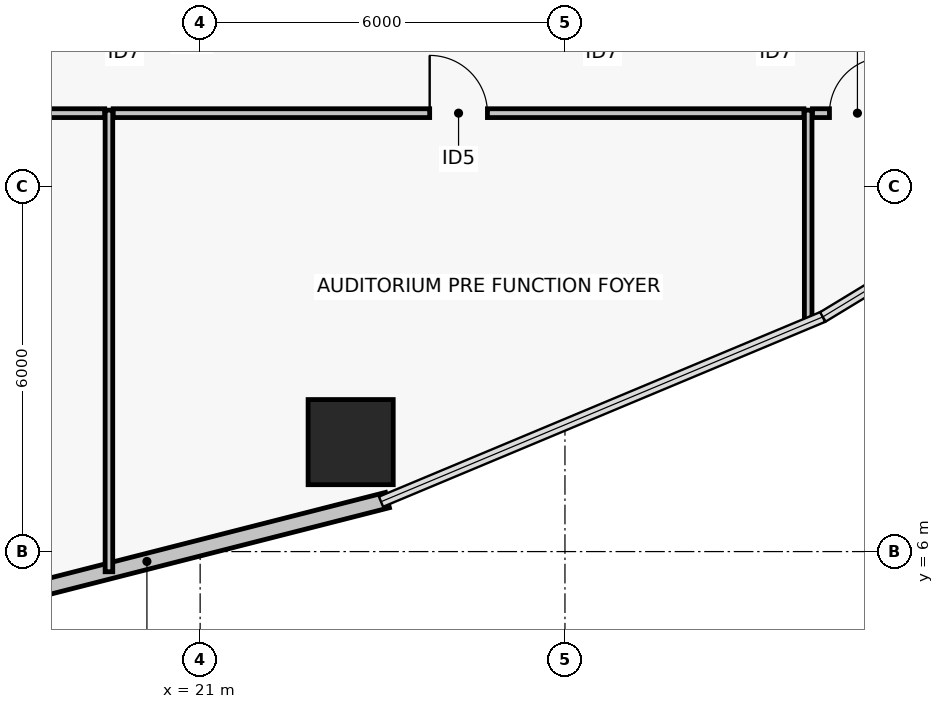
"""IFC4 building model, lengths in metres.
Left out: names, types, materials, properties, quantities, classifications, styles, units other than length and angle.
Written with IfcOpenShell. Run it as: python <this file> out.ifc"""

import sys

from ifc_helpers import new_model, si_unit, direction, frame, frame_2d, origin, origin_2d, place, context, subcontext, project, spatial, rectangle, hollow_rectangle, extrude, element, fill, save


model = new_model("IFC4")
c1 = context("Model", 3, precision=1e-05, world=origin(), true_north=direction((0.0, 1.0)))
c2 = subcontext(c1, "Body", "Model", "MODEL_VIEW")
j1 = project(units=[si_unit("LENGTHUNIT", "METRE"), si_unit("PLANEANGLEUNIT", "RADIAN")], contexts=[c1])
p1 = place(None, origin())
s1 = spatial("IfcSite", under=j1, at=p1, CompositionType="ELEMENT")
p2 = place(p1, origin())
s2 = spatial("IfcBuilding", under=s1, at=p2, CompositionType="ELEMENT")
p3 = place(p2, frame((0.0, 0.0, 18.0)))
s3 = spatial("IfcBuildingStorey", under=s2, at=p3, CompositionType="ELEMENT", Elevation=18.0)
p4 = place(p3, frame((23.476, 7.8, 0.0), z_axis=(0.0, 0.0, 1.0), x_axis=(1.0, 0.0, 0.0)))
e1 = element("IfcColumn", 1, at=p4, inside=s3, PredefinedType="COLUMN", context=c2, shape_type="SweptSolid", body=[
    extrude(hollow_rectangle(XDim=1.4, YDim=1.4, WallThickness=0.055, at=origin_2d()), origin(), (0.0, 0.0, 1.0), 4.8),
])
p5 = place(p3, frame((24.081, 6.847, 0.0), z_axis=(0.0, 0.0, 1.0), x_axis=(-0.968981557045, -0.247133045354, 0.0)))
e2 = element("IfcWall", 2, at=p5, inside=s3, PredefinedType="PARTITIONING", context=c2, shape_type="SweptSolid", body=[
    extrude(rectangle(XDim=8.167, YDim=0.26, at=frame_2d((4.083, 0.0))), origin(), (0.0, 0.0, 1.0), 4.48),
])
p6 = place(p3, frame((15.9, 13.21, 0.0), z_axis=(0.0, 0.0, 1.0), x_axis=(1.0, 0.0, 0.0)))
e3 = element("IfcWall", 3, at=p6, inside=s3, PredefinedType="PARTITIONING", context=c2, shape_type="SweptSolid", body=[
    extrude(rectangle(XDim=3.53, YDim=0.145, at=frame_2d((1.765, 0.0))), origin(), (0.0, 0.0, 1.0), 3.56),
])
p7 = place(p6, frame((0.28, 0.0, 0.0)))
e4 = element("IfcOpeningElement", 4, at=p7, cuts=e3, PredefinedType="OPENING", context=c2, shape_type="SweptSolid", body=[
    extrude(rectangle(XDim=0.92, YDim=2.05, at=frame_2d((0.46, 1.025))), frame((0.0, 0.083, 0.0), z_axis=(0.0, -1.0, 0.0), x_axis=(1.0, 0.0, 0.0)), (0.0, 0.0, 1.0), 0.165),
])
p8 = place(p3, frame((19.57, 13.21, 0.0), z_axis=(0.0, 0.0, 1.0), x_axis=(1.0, 0.0, 0.0)))
e5 = element("IfcWall", 5, at=p8, inside=s3, PredefinedType="PARTITIONING", context=c2, shape_type="SweptSolid", body=[
    extrude(rectangle(XDim=11.36, YDim=0.145, at=frame_2d((5.68, 0.0))), origin(), (0.0, 0.0, 1.0), 3.56),
])
p9 = place(p8, frame((5.205, 0.0, 0.0)))
e6 = element("IfcOpeningElement", 6, at=p9, cuts=e5, PredefinedType="OPENING", context=c2, shape_type="SweptSolid", body=[
    extrude(rectangle(XDim=0.95, YDim=2.06, at=frame_2d((0.475, 1.03))), frame((0.0, 0.083, 0.0), z_axis=(0.0, -1.0, 0.0), x_axis=(1.0, 0.0, 0.0)), (0.0, 0.0, 1.0), 0.165),
])
p10 = place(p3, frame((31.07, 13.21, 0.0), z_axis=(0.0, 0.0, 1.0), x_axis=(1.0, 0.0, 0.0)))
e7 = element("IfcWall", 7, at=p10, inside=s3, PredefinedType="PARTITIONING", context=c2, shape_type="SweptSolid", body=[
    extrude(rectangle(XDim=1.73, YDim=0.145, at=frame_2d((0.865, 0.0))), origin(), (0.0, 0.0, 1.0), 4.01),
])
p11 = place(p10, frame((0.28, 0.0, 0.0)))
e8 = element("IfcOpeningElement", 8, at=p11, cuts=e7, PredefinedType="OPENING", context=c2, shape_type="SweptSolid", body=[
    extrude(rectangle(XDim=0.92, YDim=2.05, at=frame_2d((0.46, 1.025))), frame((0.0, 0.083, 0.0), z_axis=(0.0, -1.0, 0.0), x_axis=(1.0, 0.0, 0.0)), (0.0, 0.0, 1.0), 0.165),
])
p12 = place(p3, frame((19.5, 5.668, 0.0), z_axis=(0.0, 0.0, 1.0), x_axis=(0.0, 1.0, 0.0)))
e9 = element("IfcWall", 9, at=p12, inside=s3, PredefinedType="PARTITIONING", context=c2, shape_type="SweptSolid", body=[
    extrude(rectangle(XDim=7.592, YDim=0.125, at=frame_2d((3.796, 0.0))), origin(), (0.0, 0.0, 1.0), 3.86),
])
p13 = place(p3, frame((31.0, 9.748, 0.0), z_axis=(0.0, 0.0, 1.0), x_axis=(0.0, 1.0, 0.0)))
e10 = element("IfcWall", 10, at=p13, inside=s3, PredefinedType="PARTITIONING", context=c2, shape_type="SweptSolid", body=[
    extrude(rectangle(XDim=3.512, YDim=0.125, at=frame_2d((1.756, 0.0))), origin(), (0.0, 0.0, 1.0), 3.86),
])
p14 = place(p9, origin())
e11 = element("IfcDoor", 11, at=p14, inside=s3, OperationType="SINGLE_SWING_LEFT", PredefinedType="DOOR", context=c2, shape_type="SweptSolid", body=[
    extrude(rectangle(XDim=0.95, YDim=2.06, at=frame_2d((0.475, 1.03))), frame((0.0, 0.025, 0.0), z_axis=(0.0, -1.0, 0.0), x_axis=(1.0, 0.0, 0.0)), (0.0, 0.0, 1.0), 0.05),
])
fill(e6, e11)
p15 = place(p11, origin())
e12 = element("IfcDoor", 12, at=p15, inside=s3, OperationType="SINGLE_SWING_RIGHT", PredefinedType="DOOR", context=c2, shape_type="SweptSolid", body=[
    extrude(rectangle(XDim=0.92, YDim=2.05, at=frame_2d((0.46, 1.025))), frame((0.0, 0.025, 0.0), z_axis=(0.0, -1.0, 0.0), x_axis=(1.0, 0.0, 0.0)), (0.0, 0.0, 1.0), 0.05),
])
fill(e8, e12)
save(model, sys.argv[1])
